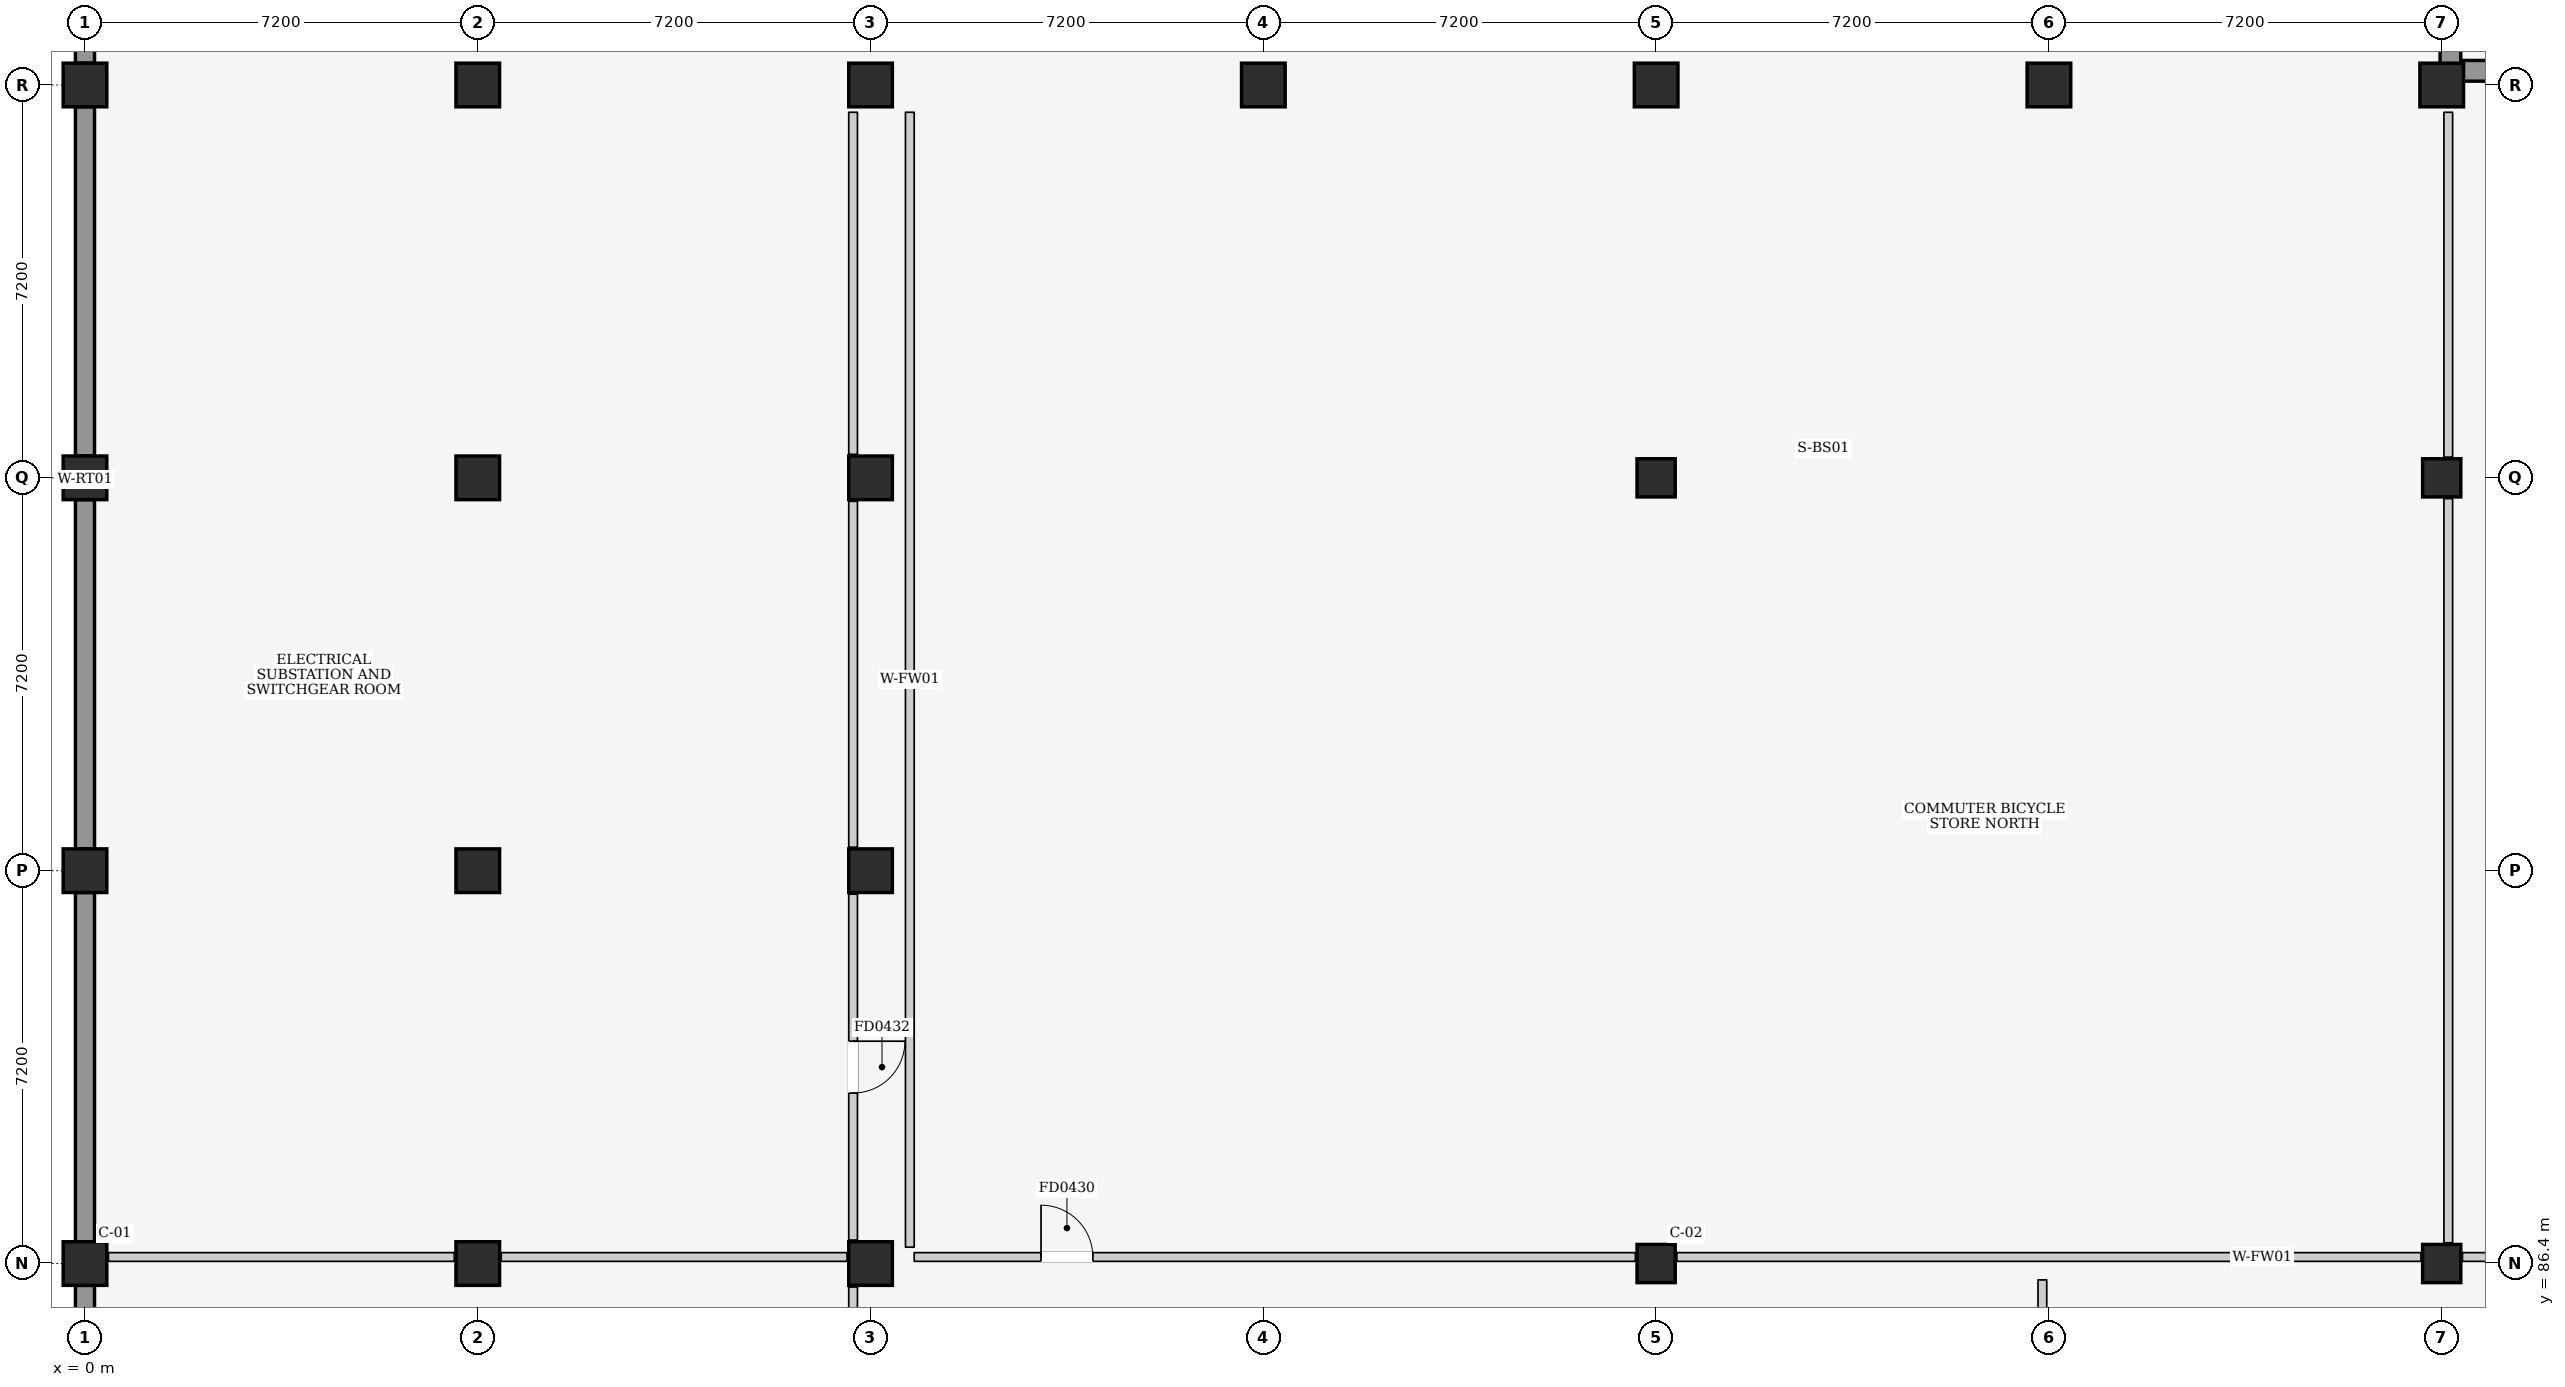
"""IFC4 building model, lengths in metres.
Left out: names, types, materials, properties, quantities, classifications, styles, units other than length and angle.
Written with IfcOpenShell. Run it as: python <this file> out.ifc"""

import sys

from ifc_helpers import new_model, si_unit, direction, frame, frame_2d, origin, origin_2d, place, context, subcontext, project, spatial, rectangle, extrude, element, fill, save


model = new_model("IFC4")
c1 = context("Model", 3, precision=1e-05, world=origin(), true_north=direction((0.0, 1.0)))
c2 = subcontext(c1, "Body", "Model", "MODEL_VIEW")
j1 = project(units=[si_unit("LENGTHUNIT", "METRE"), si_unit("PLANEANGLEUNIT", "RADIAN")], contexts=[c1])
p1 = place(None, origin())
s1 = spatial("IfcSite", under=j1, at=p1, CompositionType="ELEMENT")
p2 = place(p1, origin())
s2 = spatial("IfcBuilding", under=s1, at=p2, CompositionType="ELEMENT")
p3 = place(p2, frame((0.0, 0.0, -4.2)))
s3 = spatial("IfcBuildingStorey", under=s2, at=p3, CompositionType="ELEMENT", Elevation=-4.2)
for number, where, z_axis, x_axis in (
    (1, (0.0, 86.4, 0.0), (0.0, 0.0, 1.0), (1.0, 0.0, 0.0)),
    (2, (0.0, 93.6, 0.0), (0.0, 0.0, 1.0), (1.0, 0.0, 0.0)),
    (3, (0.0, 100.8, 0.0), (0.0, 0.0, 1.0), (1.0, 0.0, 0.0)),
    (4, (0.0, 108.0, 0.0), (0.0, 0.0, 1.0), (1.0, 0.0, 0.0)),
    (5, (7.2, 86.4, 0.0), (0.0, 0.0, 1.0), (1.0, 0.0, 0.0)),
    (6, (7.2, 93.6, 0.0), (0.0, 0.0, 1.0), (1.0, 0.0, 0.0)),
    (7, (7.2, 100.8, 0.0), (0.0, 0.0, 1.0), (1.0, 0.0, 0.0)),
    (8, (7.2, 108.0, 0.0), (0.0, 0.0, 1.0), (1.0, 0.0, 0.0)),
    (9, (14.4, 86.4, 0.0), (0.0, 0.0, 1.0), (1.0, 0.0, 0.0)),
    (10, (14.4, 93.6, 0.0), (0.0, 0.0, 1.0), (1.0, 0.0, 0.0)),
    (11, (14.4, 100.8, 0.0), (0.0, 0.0, 1.0), (1.0, 0.0, 0.0)),
    (12, (14.4, 108.0, 0.0), (0.0, 0.0, 1.0), (1.0, 0.0, 0.0)),
    (13, (21.6, 108.0, 0.0), (0.0, 0.0, 1.0), (1.0, 0.0, 0.0)),
):
    element("IfcColumn", number, at=place(p3, frame(where, z_axis=z_axis, x_axis=x_axis)), inside=s3, PredefinedType="COLUMN", context=c2, shape_type="SweptSolid", body=[
        extrude(rectangle(XDim=0.8, YDim=0.8, at=origin_2d()), origin(), (0.0, 0.0, 1.0), 4.2),
    ])
for number, where, z_axis, x_axis in (
    (14, (28.8, 86.4, 0.0), (0.0, 0.0, 1.0), (1.0, 0.0, 0.0)),
    (15, (28.8, 100.8, 0.0), (0.0, 0.0, 1.0), (1.0, 0.0, 0.0)),
):
    element("IfcColumn", number, at=place(p3, frame(where, z_axis=z_axis, x_axis=x_axis)), inside=s3, PredefinedType="COLUMN", context=c2, shape_type="SweptSolid", body=[
        extrude(rectangle(XDim=0.7, YDim=0.7, at=origin_2d()), origin(), (0.0, 0.0, 1.0), 3.98),
    ])
for number, where, z_axis, x_axis in (
    (16, (28.8, 108.0, 0.0), (0.0, 0.0, 1.0), (1.0, 0.0, 0.0)),
    (17, (36.0, 108.0, 0.0), (0.0, 0.0, 1.0), (1.0, 0.0, 0.0)),
):
    element("IfcColumn", number, at=place(p3, frame(where, z_axis=z_axis, x_axis=x_axis)), inside=s3, PredefinedType="COLUMN", context=c2, shape_type="SweptSolid", body=[
        extrude(rectangle(XDim=0.8, YDim=0.8, at=origin_2d()), origin(), (0.0, 0.0, 1.0), 4.2),
    ])
for number, where, z_axis, x_axis in (
    (18, (43.2, 86.4, 0.0), (0.0, 0.0, 1.0), (1.0, 0.0, 0.0)),
    (19, (43.2, 100.8, 0.0), (0.0, 0.0, 1.0), (1.0, 0.0, 0.0)),
):
    element("IfcColumn", number, at=place(p3, frame(where, z_axis=z_axis, x_axis=x_axis)), inside=s3, PredefinedType="COLUMN", context=c2, shape_type="SweptSolid", body=[
        extrude(rectangle(XDim=0.7, YDim=0.7, at=origin_2d()), origin(), (0.0, 0.0, 1.0), 3.98),
    ])
p4 = place(p3, frame((43.2, 108.0, 0.0), z_axis=(0.0, 0.0, 1.0), x_axis=(1.0, 0.0, 0.0)))
e20 = element("IfcColumn", 20, at=p4, inside=s3, PredefinedType="COLUMN", context=c2, shape_type="SweptSolid", body=[
    extrude(rectangle(XDim=0.8, YDim=0.8, at=origin_2d()), origin(), (0.0, 0.0, 1.0), 4.2),
])
p5 = place(p3, frame((0.0, 79.55, 0.0), z_axis=(0.0, 0.0, 1.0), x_axis=(0.0, 1.0, 0.0)))
e21 = element("IfcWall", 21, at=p5, inside=s3, PredefinedType="SOLIDWALL", context=c2, shape_type="SweptSolid", body=[
    extrude(rectangle(XDim=6.45, YDim=0.35, at=frame_2d((3.225, 0.0))), origin(), (0.0, 0.0, 1.0), 3.8),
])
for number, where, z_axis, x_axis in (
    (22, (0.0, 86.8, 0.0), (0.0, 0.0, 1.0), (0.0, 1.0, 0.0)),
    (23, (0.0, 94.0, 0.0), (0.0, 0.0, 1.0), (0.0, 1.0, 0.0)),
):
    element("IfcWall", number, at=place(p3, frame(where, z_axis=z_axis, x_axis=x_axis)), inside=s3, PredefinedType="SOLIDWALL", context=c2, shape_type="SweptSolid", body=[
        extrude(rectangle(XDim=6.4, YDim=0.35, at=frame_2d((3.2, 0.0))), origin(), (0.0, 0.0, 1.0), 3.8),
    ])
for number, where, z_axis, x_axis in (
    (24, (0.0, 101.2, 0.0), (0.0, 0.0, 1.0), (0.0, 1.0, 0.0)),
    (25, (0.0, 108.4, 0.0), (0.0, 0.0, 1.0), (0.0, 1.0, 0.0)),
):
    element("IfcWall", number, at=place(p3, frame(where, z_axis=z_axis, x_axis=x_axis)), inside=s3, PredefinedType="SOLIDWALL", context=c2, shape_type="SweptSolid", body=[
        extrude(rectangle(XDim=6.4, YDim=0.35, at=frame_2d((3.2, 0.0))), origin(), (0.0, 0.0, 1.0), 3.8),
    ])
p6 = place(p3, frame((43.55, 108.26, 0.0), z_axis=(0.0, 0.0, 1.0), x_axis=(1.0, 0.0, 0.0)))
e26 = element("IfcWall", 26, at=p6, inside=s3, PredefinedType="SHEAR", context=c2, shape_type="SweptSolid", body=[
    extrude(rectangle(XDim=6.5, YDim=0.38, at=frame_2d((3.25, 0.0))), origin(), (0.0, 0.0, 1.0), 3.79),
])
p7 = place(p3, frame((43.36, 108.07, 0.0), z_axis=(0.0, 0.0, 1.0), x_axis=(0.0, 1.0, 0.0)))
e27 = element("IfcWall", 27, at=p7, inside=s3, PredefinedType="SHEAR", context=c2, shape_type="SweptSolid", body=[
    extrude(rectangle(XDim=3.86, YDim=0.38, at=frame_2d((1.93, 0.0))), origin(), (0.0, 0.0, 1.0), 3.79),
])
p8 = place(p3, frame((43.58, 86.52, 0.0), z_axis=(0.0, 0.0, 1.0), x_axis=(1.0, 0.0, 0.0)))
e28 = element("IfcWall", 28, at=p8, inside=s3, PredefinedType="PARTITIONING", context=c2, shape_type="SweptSolid", body=[
    extrude(rectangle(XDim=13.64, YDim=0.16, at=frame_2d((6.82, 0.0))), origin(), (0.0, 0.0, 1.0), 3.79),
])
p9 = place(p8, frame((2.745, 0.0, 0.0)))
e29 = element("IfcOpeningElement", 29, at=p9, cuts=e28, PredefinedType="OPENING", context=c2, shape_type="SweptSolid", body=[
    extrude(rectangle(XDim=0.95, YDim=2.1, at=frame_2d((0.475, 1.05))), frame((0.0, 0.095, 0.0), z_axis=(0.0, -1.0, 0.0), x_axis=(1.0, 0.0, 0.0)), (0.0, 0.0, 1.0), 0.19),
])
p10 = place(p3, frame((43.32, 86.78, 0.0), z_axis=(0.0, 0.0, 1.0), x_axis=(0.0, 1.0, 0.0)))
e30 = element("IfcWall", 30, at=p10, inside=s3, PredefinedType="PARTITIONING", context=c2, shape_type="SweptSolid", body=[
    extrude(rectangle(XDim=13.64, YDim=0.16, at=frame_2d((6.82, 0.0))), origin(), (0.0, 0.0, 1.0), 3.79),
])
p11 = place(p3, frame((43.32, 101.18, 0.0), z_axis=(0.0, 0.0, 1.0), x_axis=(0.0, 1.0, 0.0)))
e31 = element("IfcWall", 31, at=p11, inside=s3, PredefinedType="PARTITIONING", context=c2, shape_type="SweptSolid", body=[
    extrude(rectangle(XDim=6.32, YDim=0.16, at=frame_2d((3.16, 0.0))), origin(), (0.0, 0.0, 1.0), 3.79),
])
p12 = place(p3, frame((15.2, 86.52, 0.0), z_axis=(0.0, 0.0, 1.0), x_axis=(1.0, 0.0, 0.0)))
e32 = element("IfcWall", 32, at=p12, inside=s3, PredefinedType="PARTITIONING", context=c2, shape_type="SweptSolid", body=[
    extrude(rectangle(XDim=13.22, YDim=0.16, at=frame_2d((6.61, 0.0))), origin(), (0.0, 0.0, 1.0), 3.79),
])
p13 = place(p12, frame((2.325, 0.0, 0.0)))
e33 = element("IfcOpeningElement", 33, at=p13, cuts=e32, PredefinedType="OPENING", context=c2, shape_type="SweptSolid", body=[
    extrude(rectangle(XDim=0.95, YDim=2.1, at=frame_2d((0.475, 1.05))), frame((0.0, 0.095, 0.0), z_axis=(0.0, -1.0, 0.0), x_axis=(1.0, 0.0, 0.0)), (0.0, 0.0, 1.0), 0.19),
])
p14 = place(p3, frame((29.18, 86.52, 0.0), z_axis=(0.0, 0.0, 1.0), x_axis=(1.0, 0.0, 0.0)))
e34 = element("IfcWall", 34, at=p14, inside=s3, PredefinedType="PARTITIONING", context=c2, shape_type="SweptSolid", body=[
    extrude(rectangle(XDim=13.64, YDim=0.16, at=frame_2d((6.82, 0.0))), origin(), (0.0, 0.0, 1.0), 3.79),
])
p15 = place(p3, frame((15.12, 86.7, 0.0), z_axis=(0.0, 0.0, 1.0), x_axis=(0.0, 1.0, 0.0)))
e35 = element("IfcWall", 35, at=p15, inside=s3, PredefinedType="PARTITIONING", context=c2, shape_type="SweptSolid", body=[
    extrude(rectangle(XDim=20.8, YDim=0.16, at=frame_2d((10.4, 0.0))), origin(), (0.0, 0.0, 1.0), 3.79),
])
for number, where, z_axis, x_axis in (
    (36, (0.43, 86.52, 0.0), (0.0, 0.0, 1.0), (1.0, 0.0, 0.0)),
    (37, (7.63, 86.52, 0.0), (0.0, 0.0, 1.0), (1.0, 0.0, 0.0)),
):
    element("IfcWall", number, at=place(p3, frame(where, z_axis=z_axis, x_axis=x_axis)), inside=s3, PredefinedType="PARTITIONING", context=c2, shape_type="SweptSolid", body=[
        extrude(rectangle(XDim=6.34, YDim=0.16, at=frame_2d((3.17, 0.0))), origin(), (0.0, 0.0, 1.0), 3.79),
    ])
p16 = place(p3, frame((14.08, 86.83, 0.0), z_axis=(0.0, 0.0, 1.0), x_axis=(0.0, 1.0, 0.0)))
e38 = element("IfcWall", 38, at=p16, inside=s3, PredefinedType="PARTITIONING", context=c2, shape_type="SweptSolid", body=[
    extrude(rectangle(XDim=6.34, YDim=0.16, at=frame_2d((3.17, 0.0))), origin(), (0.0, 0.0, 1.0), 3.79),
])
p17 = place(p16, frame((2.695, 0.0, 0.0)))
e39 = element("IfcOpeningElement", 39, at=p17, cuts=e38, PredefinedType="OPENING", context=c2, shape_type="SweptSolid", body=[
    extrude(rectangle(XDim=0.95, YDim=2.1, at=frame_2d((0.475, 1.05))), frame((0.0, 0.095, 0.0), z_axis=(0.0, -1.0, 0.0), x_axis=(1.0, 0.0, 0.0)), (0.0, 0.0, 1.0), 0.19),
])
p18 = place(p3, frame((14.08, 94.03, 0.0), z_axis=(0.0, 0.0, 1.0), x_axis=(0.0, 1.0, 0.0)))
e40 = element("IfcWall", 40, at=p18, inside=s3, PredefinedType="PARTITIONING", context=c2, shape_type="SweptSolid", body=[
    extrude(rectangle(XDim=6.34, YDim=0.16, at=frame_2d((3.17, 0.0))), origin(), (0.0, 0.0, 1.0), 3.79),
])
p19 = place(p3, frame((14.08, 101.23, 0.0), z_axis=(0.0, 0.0, 1.0), x_axis=(0.0, 1.0, 0.0)))
e41 = element("IfcWall", 41, at=p19, inside=s3, PredefinedType="PARTITIONING", context=c2, shape_type="SweptSolid", body=[
    extrude(rectangle(XDim=6.27, YDim=0.16, at=frame_2d((3.135, 0.0))), origin(), (0.0, 0.0, 1.0), 3.79),
])
p20 = place(p3, frame((14.08, 72.3, 0.0), z_axis=(0.0, 0.0, 1.0), x_axis=(0.0, 1.0, 0.0)))
e42 = element("IfcWall", 42, at=p20, inside=s3, PredefinedType="PARTITIONING", context=c2, shape_type="SweptSolid", body=[
    extrude(rectangle(XDim=13.67, YDim=0.16, at=frame_2d((6.835, 0.0))), origin(), (0.0, 0.0, 1.0), 3.79),
])
p21 = place(p20, frame((2.825, 0.0, 0.0)))
e43 = element("IfcOpeningElement", 43, at=p21, cuts=e42, PredefinedType="OPENING", context=c2, shape_type="SweptSolid", body=[
    extrude(rectangle(XDim=0.95, YDim=2.1, at=frame_2d((0.475, 1.05))), frame((0.0, 0.095, 0.0), z_axis=(0.0, -1.0, 0.0), x_axis=(1.0, 0.0, 0.0)), (0.0, 0.0, 1.0), 0.19),
])
p22 = place(p3, frame((35.88, 79.5, 0.0), z_axis=(0.0, 0.0, 1.0), x_axis=(0.0, 1.0, 0.0)))
e44 = element("IfcWall", 44, at=p22, inside=s3, PredefinedType="PARTITIONING", context=c2, shape_type="SweptSolid", body=[
    extrude(rectangle(XDim=6.6, YDim=0.16, at=frame_2d((3.3, 0.0))), origin(), (0.0, 0.0, 1.0), 3.79),
])
p23 = place(p13, origin())
e45 = element("IfcDoor", 45, at=p23, inside=s3, OperationType="SINGLE_SWING_LEFT", PredefinedType="DOOR", context=c2, shape_type="SweptSolid", body=[
    extrude(rectangle(XDim=0.95, YDim=2.1, at=frame_2d((0.475, 1.05))), frame((0.0, 0.025, 0.0), z_axis=(0.0, -1.0, 0.0), x_axis=(1.0, 0.0, 0.0)), (0.0, 0.0, 1.0), 0.05),
])
fill(e33, e45)
p24 = place(p17, frame((0.95, 0.0, 0.0), z_axis=(0.0, 0.0, 1.0), x_axis=(-1.0, 0.0, 0.0)))
e46 = element("IfcDoor", 46, at=p24, inside=s3, OperationType="SINGLE_SWING_LEFT", PredefinedType="DOOR", context=c2, shape_type="SweptSolid", body=[
    extrude(rectangle(XDim=0.95, YDim=2.1, at=frame_2d((0.475, 1.05))), frame((0.0, 0.025, 0.0), z_axis=(0.0, -1.0, 0.0), x_axis=(1.0, 0.0, 0.0)), (0.0, 0.0, 1.0), 0.05),
])
fill(e39, e46)
save(model, sys.argv[1])
